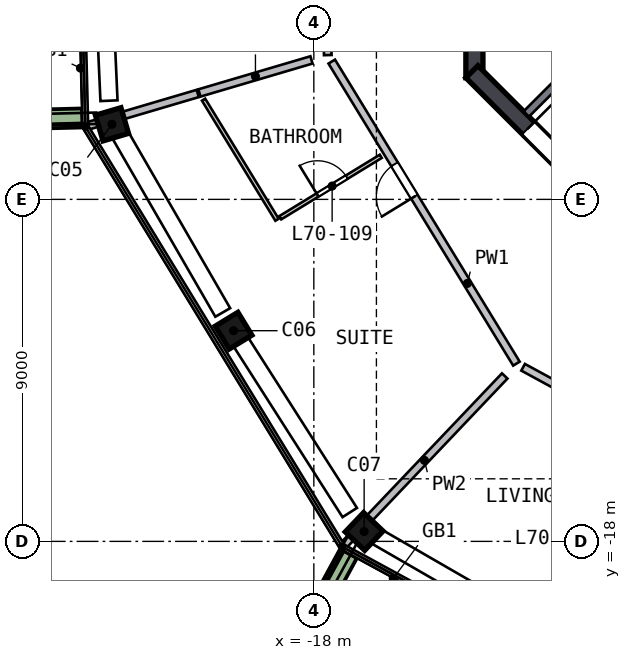
"""IFC4 building model, lengths in metres.
Left out: names, types, materials, properties, quantities, classifications, styles, units other than length and angle.
Written with IfcOpenShell. Run it as: python <this file> out.ifc"""

import sys

from ifc_helpers import new_model, si_unit, direction, frame, frame_2d, origin, origin_2d, place, context, subcontext, project, spatial, rectangle, extrude, element, fill, save


model = new_model("IFC4")
c1 = context("Model", 3, precision=1e-05, world=origin(), true_north=direction((0.0, 1.0)))
c2 = subcontext(c1, "Body", "Model", "MODEL_VIEW")
j1 = project(units=[si_unit("LENGTHUNIT", "METRE"), si_unit("PLANEANGLEUNIT", "RADIAN")], contexts=[c1])
p1 = place(None, origin())
s1 = spatial("IfcSite", under=j1, at=p1, CompositionType="ELEMENT")
p2 = place(p1, origin())
s2 = spatial("IfcBuilding", under=s1, at=p2, CompositionType="ELEMENT")
p3 = place(p2, frame((0.0, 0.0, 284.5)))
s3 = spatial("IfcBuildingStorey", under=s2, at=p3, CompositionType="ELEMENT", Elevation=284.5)
p4 = place(p3, frame((-23.353, -6.891, 0.0), z_axis=(0.033676543, -0.110836116, 0.993267963), x_axis=(-0.280681176, 0.952785536, 0.115835227)))
e1 = element("IfcColumn", 1, at=p4, inside=s3, PredefinedType="COLUMN", context=c2, shape_type="SweptSolid", body=[
    extrude(rectangle(XDim=0.7, YDim=0.7, at=origin_2d()), origin(), (0.0, 0.0, 1.0), 3.212),
])
p5 = place(p3, frame((-20.185, -12.34, 0.0), z_axis=(0.05954571, -0.095516489, 0.993645263), x_axis=(0.518491285, -0.847642965, -0.112553057)))
e2 = element("IfcColumn", 2, at=p5, inside=s3, PredefinedType="COLUMN", context=c2, shape_type="SweptSolid", body=[
    extrude(rectangle(XDim=0.7, YDim=0.7, at=origin_2d()), origin(), (0.0, 0.0, 1.0), 3.21),
])
p6 = place(p3, frame((-16.779, -17.644, 0.0), z_axis=(0.084609865, -0.079060431, 0.993272681), x_axis=(-0.719963223, 0.684283954, 0.115794763)))
e3 = element("IfcColumn", 3, at=p6, inside=s3, PredefinedType="COLUMN", context=c2, shape_type="SweptSolid", body=[
    extrude(rectangle(XDim=0.7, YDim=0.7, at=origin_2d()), origin(), (0.0, 0.0, 1.0), 3.211),
])
p7 = place(p3, frame((-13.775, 5.799, 0.0), z_axis=(0.0, 0.0, 1.0), x_axis=(0.0, -1.0, 0.0)))
e4 = element("IfcWall", 4, at=p7, inside=s3, PredefinedType="SHEAR", context=c2, shape_type="SweptSolid", body=[
    extrude(rectangle(XDim=11.598, YDim=0.45, at=frame_2d((5.799, 0.0))), origin(), (0.0, 0.0, 1.0), 3.5),
])
p8 = place(p7, frame((4.899, 0.0, 0.0)))
e5 = element("IfcOpeningElement", 5, at=p8, cuts=e4, PredefinedType="OPENING", context=c2, shape_type="SweptSolid", body=[
    extrude(rectangle(XDim=1.8, YDim=2.1, at=frame_2d((0.9, 1.05))), frame((0.0, 0.235, 0.0), z_axis=(0.0, -1.0, 0.0), x_axis=(1.0, 0.0, 0.0)), (0.0, 0.0, 1.0), 0.47),
])
p9 = place(p3, frame((-13.841, -5.64, 0.0), z_axis=(0.0, 0.0, 1.0), x_axis=(0.707106781, -0.707106781, 0.0)))
e6 = element("IfcWall", 6, at=p9, inside=s3, PredefinedType="SHEAR", context=c2, shape_type="SweptSolid", body=[
    extrude(rectangle(XDim=11.598, YDim=0.45, at=frame_2d((5.799, 0.0))), origin(), (0.0, 0.0, 1.0), 3.5),
])
p10 = place(p9, frame((2.099, 0.0, 0.0)))
e7 = element("IfcOpeningElement", 7, at=p10, cuts=e6, PredefinedType="OPENING", context=c2, shape_type="SweptSolid", body=[
    extrude(rectangle(XDim=1.2, YDim=2.1, at=frame_2d((0.6, 1.05))), frame((0.0, 0.235, 0.0), z_axis=(0.0, -1.0, 0.0), x_axis=(1.0, 0.0, 0.0)), (0.0, 0.0, 1.0), 0.47),
])
p11 = place(p3, frame((-26.793, -6.926, 0.0), z_axis=(0.0, 0.0, 1.0), x_axis=(0.999683736, 0.025148138, 0.0)))
e8 = element("IfcWall", 8, at=p11, inside=s3, PredefinedType="SOLIDWALL", context=c2, shape_type="SweptSolid", body=[
    extrude(rectangle(XDim=2.699, YDim=0.5, at=frame_2d((1.349, 0.0))), origin(), (0.0, 0.0, 1.0), 0.7),
])
p12 = place(p3, frame((-17.087, -18.319, 0.0), z_axis=(0.0, 0.0, 1.0), x_axis=(-0.478049873, -0.878332693, 0.0)))
e9 = element("IfcWall", 9, at=p12, inside=s3, PredefinedType="SOLIDWALL", context=c2, shape_type="SweptSolid", body=[
    extrude(rectangle(XDim=3.199, YDim=0.5, at=frame_2d((1.6, 0.0))), origin(), (0.0, 0.0, 1.0), 0.7),
])
p13 = place(p3, frame((-9.334, -3.677, 0.0), z_axis=(0.0, 0.0, 1.0), x_axis=(-0.707106781, -0.707106781, 0.0)))
e10 = element("IfcWall", 10, at=p13, inside=s3, PredefinedType="SOLIDWALL", context=c2, shape_type="SweptSolid", body=[
    extrude(rectangle(XDim=4.35, YDim=0.2, at=frame_2d((2.175, 0.0))), origin(), (0.0, 0.0, 1.0), 3.19),
])
p14 = place(p3, frame((-17.633, -5.203, 0.0), z_axis=(0.0, 0.0, 1.0), x_axis=(-0.025130335, 0.999684183, 0.0)))
e11 = element("IfcWall", 11, at=p14, inside=s3, PredefinedType="SOLIDWALL", context=c2, shape_type="SweptSolid", body=[
    extrude(rectangle(XDim=9.317, YDim=0.2, at=frame_2d((4.658, 0.0))), origin(), (0.0, 0.0, 1.0), 3.19),
])
p15 = place(p14, frame((1.9, 0.0, 0.0)))
e12 = element("IfcOpeningElement", 12, at=p15, cuts=e11, PredefinedType="OPENING", context=c2, shape_type="SweptSolid", body=[
    extrude(rectangle(XDim=1.0, YDim=2.1, at=frame_2d((0.5, 1.05))), frame((0.0, 0.11, 0.0), z_axis=(0.0, -1.0, 0.0), x_axis=(1.0, 0.0, 0.0)), (0.0, 0.0, 1.0), 0.22),
])
p16 = place(p3, frame((-12.669, -13.323, 0.0), z_axis=(0.0, 0.0, 1.0), x_axis=(-0.521611117, 0.853183358, 0.0)))
e13 = element("IfcWall", 13, at=p16, inside=s3, PredefinedType="SOLIDWALL", context=c2, shape_type="SweptSolid", body=[
    extrude(rectangle(XDim=9.317, YDim=0.2, at=frame_2d((4.658, 0.0))), origin(), (0.0, 0.0, 1.0), 3.19),
])
p17 = place(p16, frame((5.15, 0.0, 0.0)))
e14 = element("IfcOpeningElement", 14, at=p17, cuts=e13, PredefinedType="OPENING", context=c2, shape_type="SweptSolid", body=[
    extrude(rectangle(XDim=1.0, YDim=2.1, at=frame_2d((0.5, 1.05))), frame((0.0, 0.11, 0.0), z_axis=(0.0, -1.0, 0.0), x_axis=(1.0, 0.0, 0.0)), (0.0, 0.0, 1.0), 0.22),
])
p18 = place(p3, frame((-4.486, -17.777, 0.0), z_axis=(0.0, 0.0, 1.0), x_axis=(-0.878320972, 0.478071407, 0.0)))
e15 = element("IfcWall", 15, at=p18, inside=s3, PredefinedType="SOLIDWALL", context=c2, shape_type="SweptSolid", body=[
    extrude(rectangle(XDim=9.117, YDim=0.2, at=frame_2d((4.558, 0.0))), origin(), (0.0, 0.0, 1.0), 3.19),
])
p19 = place(p18, frame((6.458, 0.0, 0.0)))
e16 = element("IfcOpeningElement", 16, at=p19, cuts=e15, PredefinedType="OPENING", context=c2, shape_type="SweptSolid", body=[
    extrude(rectangle(XDim=1.0, YDim=2.1, at=frame_2d((0.5, 1.05))), frame((0.0, 0.11, 0.0), z_axis=(0.0, -1.0, 0.0), x_axis=(1.0, 0.0, 0.0)), (0.0, 0.0, 1.0), 0.22),
])
p20 = place(p3, frame((-21.055, -6.213, 0.0), z_axis=(0.0, 0.0, 1.0), x_axis=(-0.95911728, -0.283008911, 0.0)))
e17 = element("IfcWall", 17, at=p20, inside=s3, PredefinedType="SOLIDWALL", context=c2, shape_type="SweptSolid", body=[
    extrude(rectangle(XDim=3.011, YDim=0.2, at=frame_2d((1.506, 0.0))), origin(), (0.0, 0.0, 1.0), 3.19),
])
p21 = place(p3, frame((-18.062, -5.33, 0.0), z_axis=(0.0, 0.0, 1.0), x_axis=(-0.959121115, -0.282995915, 0.0)))
e18 = element("IfcWall", 18, at=p21, inside=s3, PredefinedType="SOLIDWALL", context=c2, shape_type="SweptSolid", body=[
    extrude(rectangle(XDim=3.075, YDim=0.2, at=frame_2d((1.537, 0.0))), origin(), (0.0, 0.0, 1.0), 3.19),
])
p22 = place(p3, frame((-12.977, -13.647, 0.0), z_axis=(0.0, 0.0, 1.0), x_axis=(-0.689127097, -0.724640493, 0.0)))
e19 = element("IfcWall", 19, at=p22, inside=s3, PredefinedType="SOLIDWALL", context=c2, shape_type="SweptSolid", body=[
    extrude(rectangle(XDim=6.132, YDim=0.2, at=frame_2d((3.066, 0.0))), origin(), (0.0, 0.0, 1.0), 3.19),
])
p23 = place(p3, frame((-18.969, -9.536, 0.0), z_axis=(0.0, 0.0, 1.0), x_axis=(-0.521583314, 0.853200356, 0.0)))
e20 = element("IfcWall", 20, at=p23, inside=s3, PredefinedType="PARTITIONING", context=c2, shape_type="SweptSolid", body=[
    extrude(rectangle(XDim=3.704, YDim=0.1, at=frame_2d((1.852, 0.0))), origin(), (0.0, 0.0, 1.0), 3.19),
])
p24 = place(p3, frame((-18.884, -9.484, 0.0), z_axis=(0.0, 0.0, 1.0), x_axis=(0.85318253, 0.521612471, 0.0)))
e21 = element("IfcWall", 21, at=p24, inside=s3, PredefinedType="PARTITIONING", context=c2, shape_type="SweptSolid", body=[
    extrude(rectangle(XDim=3.1, YDim=0.1, at=frame_2d((1.55, 0.0))), origin(), (0.0, 0.0, 1.0), 3.19),
])
p25 = place(p24, frame((1.15, 0.0, 0.0)))
e22 = element("IfcOpeningElement", 22, at=p25, cuts=e21, PredefinedType="OPENING", context=c2, shape_type="SweptSolid", body=[
    extrude(rectangle(XDim=0.9, YDim=2.1, at=frame_2d((0.45, 1.05))), frame((0.0, 0.06, 0.0), z_axis=(0.0, -1.0, 0.0), x_axis=(1.0, 0.0, 0.0)), (0.0, 0.0, 1.0), 0.12),
])
p26 = place(p10, origin())
e23 = element("IfcDoor", 23, at=p26, inside=s3, OperationType="SINGLE_SWING_LEFT", PredefinedType="DOOR", context=c2, shape_type="SweptSolid", body=[
    extrude(rectangle(XDim=1.2, YDim=2.1, at=frame_2d((0.6, 1.05))), frame((0.0, 0.025, 0.0), z_axis=(0.0, -1.0, 0.0), x_axis=(1.0, 0.0, 0.0)), (0.0, 0.0, 1.0), 0.05),
])
fill(e7, e23)
p27 = place(p17, origin())
e24 = element("IfcDoor", 24, at=p27, inside=s3, OperationType="SINGLE_SWING_LEFT", PredefinedType="DOOR", context=c2, shape_type="SweptSolid", body=[
    extrude(rectangle(XDim=1.0, YDim=2.1, at=frame_2d((0.5, 1.05))), frame((0.0, 0.025, 0.0), z_axis=(0.0, -1.0, 0.0), x_axis=(1.0, 0.0, 0.0)), (0.0, 0.0, 1.0), 0.05),
])
fill(e14, e24)
p28 = place(p25, origin())
e25 = element("IfcDoor", 25, at=p28, inside=s3, OperationType="SINGLE_SWING_LEFT", PredefinedType="DOOR", context=c2, shape_type="SweptSolid", body=[
    extrude(rectangle(XDim=0.9, YDim=2.1, at=frame_2d((0.45, 1.05))), frame((0.0, 0.025, 0.0), z_axis=(0.0, -1.0, 0.0), x_axis=(1.0, 0.0, 0.0)), (0.0, 0.0, 1.0), 0.05),
])
fill(e22, e25)
save(model, sys.argv[1])
